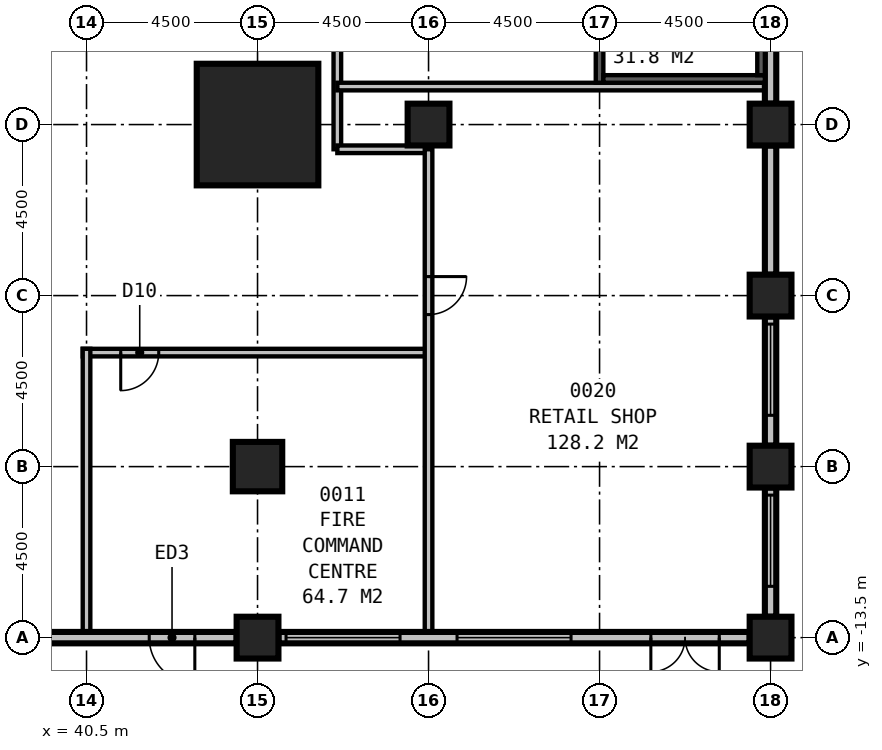
"""IFC4 building model, lengths in metres.
Left out: names, types, materials, properties, quantities, classifications, styles, units other than length and angle.
Written with IfcOpenShell. Run it as: python <this file> out.ifc"""

import sys

from ifc_helpers import new_model, si_unit, direction, frame, frame_2d, origin, origin_2d, place, context, subcontext, project, spatial, rectangle, extrude, element, fill, save


model = new_model("IFC4")
c1 = context("Model", 3, precision=1e-05, world=origin(), true_north=direction((0.0, 1.0)))
c2 = subcontext(c1, "Body", "Model", "MODEL_VIEW")
j1 = project(units=[si_unit("LENGTHUNIT", "METRE"), si_unit("PLANEANGLEUNIT", "RADIAN")], contexts=[c1])
p1 = place(None, origin())
s1 = spatial("IfcSite", under=j1, at=p1, CompositionType="ELEMENT")
p2 = place(p1, origin())
s2 = spatial("IfcBuilding", under=s1, at=p2, CompositionType="ELEMENT")
p3 = place(p2, origin())
s3 = spatial("IfcBuildingStorey", under=s2, at=p3, CompositionType="ELEMENT", Elevation=0.0)
p4 = place(p3, frame((45.0, 0.0, 0.0), z_axis=(0.0, 0.0, 1.0), x_axis=(1.0, 0.0, 0.0)))
e1 = element("IfcColumn", 1, at=p4, inside=s3, PredefinedType="COLUMN", context=c2, shape_type="SweptSolid", body=[
    extrude(rectangle(XDim=3.2, YDim=3.2, at=origin_2d()), origin(), (0.0, 0.0, 1.0), 6.0),
])
for number, where, z_axis, x_axis in (
    (2, (58.5, -13.5, 0.0), (0.0, 0.0, 1.0), (1.0, 0.0, 0.0)),
    (3, (58.5, -4.5, 0.0), (0.0, 0.0, 1.0), (1.0, 0.0, 0.0)),
    (4, (58.5, 0.0, 0.0), (0.0, 0.0, 1.0), (1.0, 0.0, 0.0)),
    (5, (45.0, -13.5, 0.0), (0.0, 0.0, 1.0), (1.0, 0.0, 0.0)),
):
    element("IfcColumn", number, at=place(p3, frame(where, z_axis=z_axis, x_axis=x_axis)), inside=s3, PredefinedType="COLUMN", context=c2, shape_type="SweptSolid", body=[
        extrude(rectangle(XDim=1.1, YDim=1.1, at=origin_2d()), origin(), (0.0, 0.0, 1.0), 6.0),
    ])
p5 = place(p3, frame((45.0, -9.0, 0.0), z_axis=(0.0, 0.0, 1.0), x_axis=(1.0, 0.0, 0.0)))
e6 = element("IfcColumn", 6, at=p5, inside=s3, PredefinedType="COLUMN", context=c2, shape_type="SweptSolid", body=[
    extrude(rectangle(XDim=1.3, YDim=1.3, at=origin_2d()), origin(), (0.0, 0.0, 1.0), 6.0),
])
for number, where, z_axis, x_axis in (
    (7, (58.5, -9.0, 0.0), (0.0, 0.0, 1.0), (1.0, 0.0, 0.0)),
    (8, (49.5, 0.0, 0.0), (0.0, 0.0, 1.0), (1.0, 0.0, 0.0)),
):
    element("IfcColumn", number, at=place(p3, frame(where, z_axis=z_axis, x_axis=x_axis)), inside=s3, PredefinedType="COLUMN", context=c2, shape_type="SweptSolid", body=[
        extrude(rectangle(XDim=1.1, YDim=1.1, at=origin_2d()), origin(), (0.0, 0.0, 1.0), 6.0),
    ])
p6 = place(p3, frame((36.55, -13.5, 0.0), z_axis=(0.0, 0.0, 1.0), x_axis=(1.0, 0.0, 0.0)))
e9 = element("IfcWall", 9, at=p6, inside=s3, PredefinedType="STANDARD", context=c2, shape_type="SweptSolid", body=[
    extrude(rectangle(XDim=7.9, YDim=0.3, at=frame_2d((3.95, 0.0))), origin(), (0.0, 0.0, 1.0), 4.1),
])
p7 = place(p6, frame((2.9, 0.0, 0.0), z_axis=(0.0, 0.0, 1.0), x_axis=(-1.0, 0.0, 0.0)))
e10 = element("IfcOpeningElement", 10, at=p7, cuts=e9, PredefinedType="OPENING", context=c2, shape_type="SweptSolid", body=[
    extrude(rectangle(XDim=2.4, YDim=3.0, at=frame_2d((1.2, 1.5))), frame((0.0, 0.16, 0.0), z_axis=(0.0, -1.0, 0.0), x_axis=(1.0, 0.0, 0.0)), (0.0, 0.0, 1.0), 0.32),
])
p8 = place(p6, frame((6.8, 0.0, 0.0), z_axis=(0.0, 0.0, 1.0), x_axis=(-1.0, 0.0, 0.0)))
e11 = element("IfcOpeningElement", 11, at=p8, cuts=e9, PredefinedType="OPENING", context=c2, shape_type="SweptSolid", body=[
    extrude(rectangle(XDim=1.2, YDim=2.4, at=frame_2d((0.6, 1.2))), frame((0.0, 0.16, 0.0), z_axis=(0.0, -1.0, 0.0), x_axis=(1.0, 0.0, 0.0)), (0.0, 0.0, 1.0), 0.32),
])
p9 = place(p3, frame((45.55, -13.5, 0.0), z_axis=(0.0, 0.0, 1.0), x_axis=(1.0, 0.0, 0.0)))
e12 = element("IfcWall", 12, at=p9, inside=s3, PredefinedType="STANDARD", context=c2, shape_type="SweptSolid", body=[
    extrude(rectangle(XDim=12.4, YDim=0.3, at=frame_2d((6.2, 0.0))), origin(), (0.0, 0.0, 1.0), 4.0),
])
p10 = place(p9, frame((11.6, 0.0, 0.0), z_axis=(0.0, 0.0, 1.0), x_axis=(-1.0, 0.0, 0.0)))
e13 = element("IfcOpeningElement", 13, at=p10, cuts=e12, PredefinedType="OPENING", context=c2, shape_type="SweptSolid", body=[
    extrude(rectangle(XDim=1.8, YDim=2.4, at=frame_2d((0.9, 1.2))), frame((0.0, 0.16, 0.0), z_axis=(0.0, -1.0, 0.0), x_axis=(1.0, 0.0, 0.0)), (0.0, 0.0, 1.0), 0.32),
])
p11 = place(p9, frame((0.2, 0.0, 0.5)))
e14 = element("IfcOpeningElement", 14, at=p11, cuts=e12, PredefinedType="OPENING", context=c2, shape_type="SweptSolid", body=[
    extrude(rectangle(XDim=3.0, YDim=3.0, at=frame_2d((1.5, 1.5))), frame((0.0, 0.16, 0.0), z_axis=(0.0, -1.0, 0.0), x_axis=(1.0, 0.0, 0.0)), (0.0, 0.0, 1.0), 0.32),
])
p12 = place(p9, frame((4.7, 0.0, 0.5)))
e15 = element("IfcOpeningElement", 15, at=p12, cuts=e12, PredefinedType="OPENING", context=c2, shape_type="SweptSolid", body=[
    extrude(rectangle(XDim=3.0, YDim=3.0, at=frame_2d((1.5, 1.5))), frame((0.0, 0.16, 0.0), z_axis=(0.0, -1.0, 0.0), x_axis=(1.0, 0.0, 0.0)), (0.0, 0.0, 1.0), 0.32),
])
p13 = place(p3, frame((58.5, -12.95, 0.0), z_axis=(0.0, 0.0, 1.0), x_axis=(0.0, 1.0, 0.0)))
e16 = element("IfcWall", 16, at=p13, inside=s3, PredefinedType="STANDARD", context=c2, shape_type="SweptSolid", body=[
    extrude(rectangle(XDim=3.4, YDim=0.3, at=frame_2d((1.7, 0.0))), origin(), (0.0, 0.0, 1.0), 4.8),
])
p14 = place(p13, frame((0.8, 0.0, 0.5)))
e17 = element("IfcOpeningElement", 17, at=p14, cuts=e16, PredefinedType="OPENING", context=c2, shape_type="SweptSolid", body=[
    extrude(rectangle(XDim=2.4, YDim=3.0, at=frame_2d((1.2, 1.5))), frame((0.0, 0.16, 0.0), z_axis=(0.0, -1.0, 0.0), x_axis=(1.0, 0.0, 0.0)), (0.0, 0.0, 1.0), 0.32),
])
p15 = place(p3, frame((58.5, -8.45, 0.0), z_axis=(0.0, 0.0, 1.0), x_axis=(0.0, 1.0, 0.0)))
e18 = element("IfcWall", 18, at=p15, inside=s3, PredefinedType="STANDARD", context=c2, shape_type="SweptSolid", body=[
    extrude(rectangle(XDim=3.4, YDim=0.3, at=frame_2d((1.7, 0.0))), origin(), (0.0, 0.0, 1.0), 4.8),
])
p16 = place(p15, frame((0.8, 0.0, 0.5)))
e19 = element("IfcOpeningElement", 19, at=p16, cuts=e18, PredefinedType="OPENING", context=c2, shape_type="SweptSolid", body=[
    extrude(rectangle(XDim=2.4, YDim=3.0, at=frame_2d((1.2, 1.5))), frame((0.0, 0.16, 0.0), z_axis=(0.0, -1.0, 0.0), x_axis=(1.0, 0.0, 0.0)), (0.0, 0.0, 1.0), 0.32),
])
for number, where, z_axis, x_axis in (
    (20, (58.5, -3.95, 0.0), (0.0, 0.0, 1.0), (0.0, 1.0, 0.0)),
    (21, (58.5, 0.55, 0.0), (0.0, 0.0, 1.0), (0.0, 1.0, 0.0)),
):
    element("IfcWall", number, at=place(p3, frame(where, z_axis=z_axis, x_axis=x_axis)), inside=s3, PredefinedType="STANDARD", context=c2, shape_type="SweptSolid", body=[
        extrude(rectangle(XDim=3.4, YDim=0.3, at=frame_2d((1.7, 0.0))), origin(), (0.0, 0.0, 1.0), 4.8),
    ])
p17 = place(p3, frame((54.0, 1.1, 0.0), z_axis=(0.0, 0.0, 1.0), x_axis=(0.0, 1.0, 0.0)))
e22 = element("IfcWall", 22, at=p17, inside=s3, PredefinedType="SOLIDWALL", context=c2, shape_type="SweptSolid", body=[
    extrude(rectangle(XDim=8.05, YDim=0.2, at=frame_2d((4.025, 0.0))), origin(), (0.0, 0.0, 1.0), 5.7),
])
p18 = place(p17, frame((7.85, 0.0, 0.0), z_axis=(0.0, 0.0, 1.0), x_axis=(-1.0, 0.0, 0.0)))
e23 = element("IfcOpeningElement", 23, at=p18, cuts=e22, PredefinedType="OPENING", context=c2, shape_type="SweptSolid", body=[
    extrude(rectangle(XDim=1.2, YDim=2.1, at=frame_2d((0.6, 1.05))), frame((0.0, 0.11, 0.0), z_axis=(0.0, -1.0, 0.0), x_axis=(1.0, 0.0, 0.0)), (0.0, 0.0, 1.0), 0.22),
])
p19 = place(p3, frame((54.1, 1.2, 0.0), z_axis=(0.0, 0.0, 1.0), x_axis=(1.0, 0.0, 0.0)))
e24 = element("IfcWall", 24, at=p19, inside=s3, PredefinedType="SOLIDWALL", context=c2, shape_type="SweptSolid", body=[
    extrude(rectangle(XDim=4.25, YDim=0.2, at=frame_2d((2.125, 0.0))), origin(), (0.0, 0.0, 1.0), 5.7),
])
p20 = place(p3, frame((58.25, 1.3, 0.0), z_axis=(0.0, 0.0, 1.0), x_axis=(0.0, 1.0, 0.0)))
e25 = element("IfcWall", 25, at=p20, inside=s3, PredefinedType="SOLIDWALL", context=c2, shape_type="SweptSolid", body=[
    extrude(rectangle(XDim=2.65, YDim=0.2, at=frame_2d((1.325, 0.0))), origin(), (0.0, 0.0, 1.0), 5.7),
])
p21 = place(p3, frame((49.5, -13.5, 0.0), z_axis=(0.0, 0.0, 1.0), x_axis=(0.0, 1.0, 0.0)))
e26 = element("IfcWall", 26, at=p21, inside=s3, PredefinedType="PARTITIONING", context=c2, shape_type="SweptSolid", body=[
    extrude(rectangle(XDim=12.85, YDim=0.2, at=frame_2d((6.425, 0.0))), origin(), (0.0, 0.0, 1.0), 5.7),
])
p22 = place(p21, frame((9.5, 0.0, 0.0), z_axis=(0.0, 0.0, 1.0), x_axis=(-1.0, 0.0, 0.0)))
e27 = element("IfcOpeningElement", 27, at=p22, cuts=e26, PredefinedType="OPENING", context=c2, shape_type="SweptSolid", body=[
    extrude(rectangle(XDim=1.0, YDim=2.1, at=frame_2d((0.5, 1.05))), frame((0.0, 0.11, 0.0), z_axis=(0.0, -1.0, 0.0), x_axis=(1.0, 0.0, 0.0)), (0.0, 0.0, 1.0), 0.22),
])
p23 = place(p3, frame((47.1, -0.65, 0.0), z_axis=(0.0, 0.0, 1.0), x_axis=(1.0, 0.0, 0.0)))
e28 = element("IfcWall", 28, at=p23, inside=s3, PredefinedType="PARTITIONING", context=c2, shape_type="SweptSolid", body=[
    extrude(rectangle(XDim=2.4, YDim=0.2, at=frame_2d((1.2, 0.0))), origin(), (0.0, 0.0, 1.0), 4.8),
])
p24 = place(p3, frame((47.1, -0.65, 0.0), z_axis=(0.0, 0.0, 1.0), x_axis=(0.0, 1.0, 0.0)))
e29 = element("IfcWall", 29, at=p24, inside=s3, PredefinedType="PARTITIONING", context=c2, shape_type="SweptSolid", body=[
    extrude(rectangle(XDim=11.05, YDim=0.2, at=frame_2d((5.525, 0.0))), origin(), (0.0, 0.0, 1.0), 5.7),
])
p25 = place(p3, frame((40.5, -13.5, 0.0), z_axis=(0.0, 0.0, 1.0), x_axis=(0.0, 1.0, 0.0)))
e30 = element("IfcWall", 30, at=p25, inside=s3, PredefinedType="PARTITIONING", context=c2, shape_type="SweptSolid", body=[
    extrude(rectangle(XDim=7.6, YDim=0.2, at=frame_2d((3.8, 0.0))), origin(), (0.0, 0.0, 1.0), 5.7),
])
p26 = place(p3, frame((40.4, -6.0, 0.0), z_axis=(0.0, 0.0, 1.0), x_axis=(1.0, 0.0, 0.0)))
e31 = element("IfcWall", 31, at=p26, inside=s3, PredefinedType="PARTITIONING", context=c2, shape_type="SweptSolid", body=[
    extrude(rectangle(XDim=9.1, YDim=0.2, at=frame_2d((4.55, 0.0))), origin(), (0.0, 0.0, 1.0), 5.7),
])
p27 = place(p26, frame((2.0, 0.0, 0.0), z_axis=(0.0, 0.0, 1.0), x_axis=(-1.0, 0.0, 0.0)))
e32 = element("IfcOpeningElement", 32, at=p27, cuts=e31, PredefinedType="OPENING", context=c2, shape_type="SweptSolid", body=[
    extrude(rectangle(XDim=1.0, YDim=2.1, at=frame_2d((0.5, 1.05))), frame((0.0, 0.11, 0.0), z_axis=(0.0, -1.0, 0.0), x_axis=(1.0, 0.0, 0.0)), (0.0, 0.0, 1.0), 0.22),
])
p28 = place(p3, frame((47.1, 1.0, 0.0), z_axis=(0.0, 0.0, 1.0), x_axis=(1.0, 0.0, 0.0)))
e33 = element("IfcWall", 33, at=p28, inside=s3, PredefinedType="PARTITIONING", context=c2, shape_type="SweptSolid", body=[
    extrude(rectangle(XDim=11.4, YDim=0.2, at=frame_2d((5.7, 0.0))), origin(), (0.0, 0.0, 1.0), 4.8),
])
p29 = place(p8, origin())
e34 = element("IfcDoor", 34, at=p29, inside=s3, OperationType="SINGLE_SWING_LEFT", PredefinedType="DOOR", context=c2, shape_type="SweptSolid", body=[
    extrude(rectangle(XDim=1.2, YDim=2.4, at=frame_2d((0.6, 1.2))), frame((0.0, 0.025, 0.0), z_axis=(0.0, -1.0, 0.0), x_axis=(1.0, 0.0, 0.0)), (0.0, 0.0, 1.0), 0.05),
])
fill(e11, e34)
p30 = place(p10, origin())
e35 = element("IfcDoor", 35, at=p30, inside=s3, OperationType="DOUBLE_DOOR_SINGLE_SWING", PredefinedType="DOOR", context=c2, shape_type="SweptSolid", body=[
    extrude(rectangle(XDim=1.8, YDim=2.4, at=frame_2d((0.9, 1.2))), frame((0.0, 0.025, 0.0), z_axis=(0.0, -1.0, 0.0), x_axis=(1.0, 0.0, 0.0)), (0.0, 0.0, 1.0), 0.05),
])
fill(e13, e35)
p31 = place(p11, origin())
e36 = element("IfcWindow", 36, at=p31, inside=s3, PartitioningType="SINGLE_PANEL", PredefinedType="WINDOW", context=c2, shape_type="SweptSolid", body=[
    extrude(rectangle(XDim=3.0, YDim=3.0, at=frame_2d((1.5, 1.5))), frame((0.0, 0.03, 0.0), z_axis=(0.0, -1.0, 0.0), x_axis=(1.0, 0.0, 0.0)), (0.0, 0.0, 1.0), 0.06),
])
fill(e14, e36)
p32 = place(p12, origin())
e37 = element("IfcWindow", 37, at=p32, inside=s3, PartitioningType="SINGLE_PANEL", PredefinedType="WINDOW", context=c2, shape_type="SweptSolid", body=[
    extrude(rectangle(XDim=3.0, YDim=3.0, at=frame_2d((1.5, 1.5))), frame((0.0, 0.03, 0.0), z_axis=(0.0, -1.0, 0.0), x_axis=(1.0, 0.0, 0.0)), (0.0, 0.0, 1.0), 0.06),
])
fill(e15, e37)
p33 = place(p14, origin())
e38 = element("IfcWindow", 38, at=p33, inside=s3, PartitioningType="SINGLE_PANEL", PredefinedType="WINDOW", context=c2, shape_type="SweptSolid", body=[
    extrude(rectangle(XDim=2.4, YDim=3.0, at=frame_2d((1.2, 1.5))), frame((0.0, 0.03, 0.0), z_axis=(0.0, -1.0, 0.0), x_axis=(1.0, 0.0, 0.0)), (0.0, 0.0, 1.0), 0.06),
])
fill(e17, e38)
p34 = place(p16, origin())
e39 = element("IfcWindow", 39, at=p34, inside=s3, PartitioningType="SINGLE_PANEL", PredefinedType="WINDOW", context=c2, shape_type="SweptSolid", body=[
    extrude(rectangle(XDim=2.4, YDim=3.0, at=frame_2d((1.2, 1.5))), frame((0.0, 0.03, 0.0), z_axis=(0.0, -1.0, 0.0), x_axis=(1.0, 0.0, 0.0)), (0.0, 0.0, 1.0), 0.06),
])
fill(e19, e39)
p35 = place(p22, origin())
e40 = element("IfcDoor", 40, at=p35, inside=s3, OperationType="SINGLE_SWING_LEFT", PredefinedType="DOOR", context=c2, shape_type="SweptSolid", body=[
    extrude(rectangle(XDim=1.0, YDim=2.1, at=frame_2d((0.5, 1.05))), frame((0.0, 0.025, 0.0), z_axis=(0.0, -1.0, 0.0), x_axis=(1.0, 0.0, 0.0)), (0.0, 0.0, 1.0), 0.05),
])
fill(e27, e40)
p36 = place(p27, origin())
e41 = element("IfcDoor", 41, at=p36, inside=s3, OperationType="SINGLE_SWING_RIGHT", PredefinedType="DOOR", context=c2, shape_type="SweptSolid", body=[
    extrude(rectangle(XDim=1.0, YDim=2.1, at=frame_2d((0.5, 1.05))), frame((0.0, 0.025, 0.0), z_axis=(0.0, -1.0, 0.0), x_axis=(1.0, 0.0, 0.0)), (0.0, 0.0, 1.0), 0.05),
])
fill(e32, e41)
save(model, sys.argv[1])
